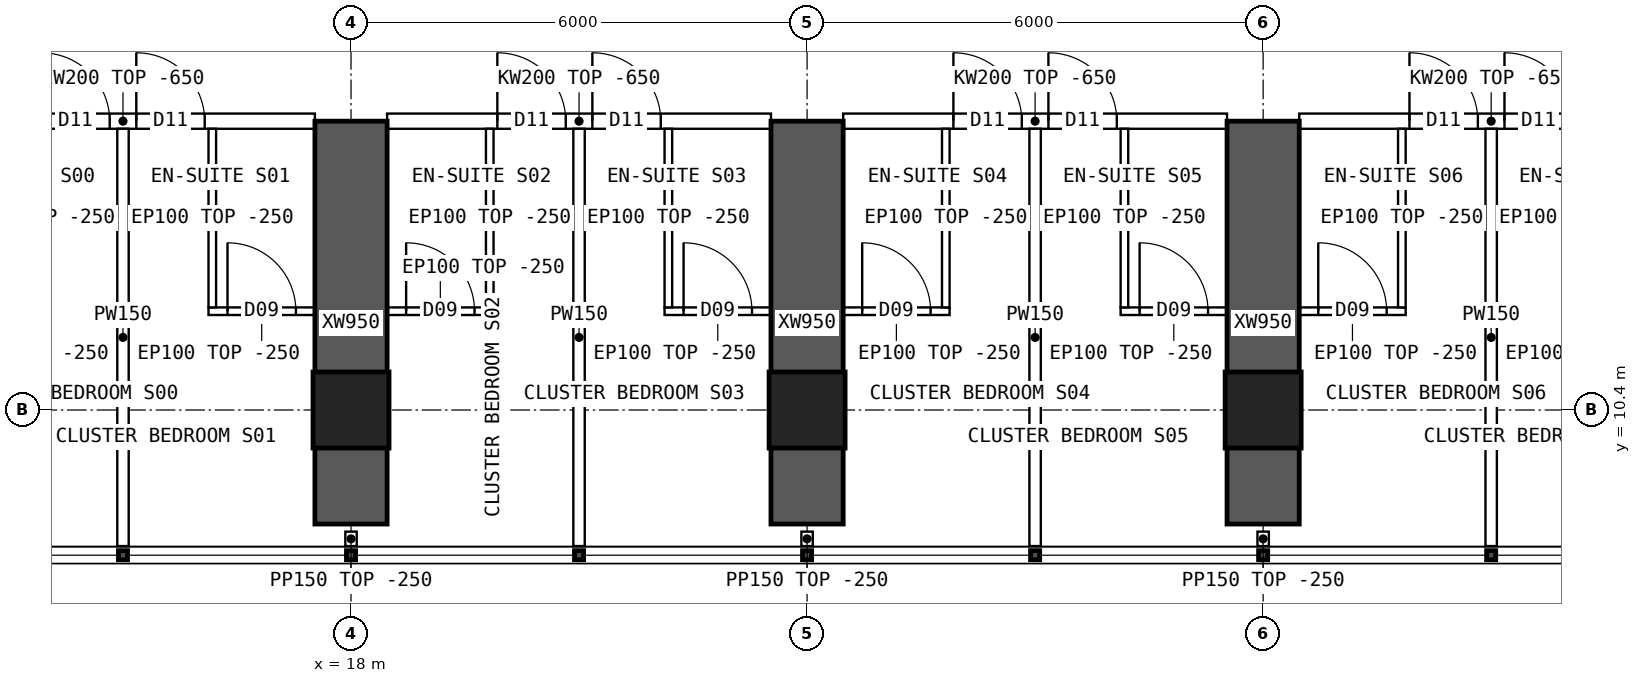
"""IFC4 building model, lengths in metres.
Left out: names, types, materials, properties, quantities, classifications, styles, units other than length and angle.
Written with IfcOpenShell. Run it as: python <this file> out.ifc"""

import sys

from ifc_helpers import new_model, si_unit, direction, frame, frame_2d, origin, origin_2d, place, context, subcontext, project, spatial, polyline, rectangle, hollow_rectangle, outline, extrude, element, fill, save


model = new_model("IFC4")
c1 = context("Model", 3, precision=1e-05, world=origin(), true_north=direction((0.0, 1.0)))
c2 = subcontext(c1, "Body", "Model", "MODEL_VIEW")
j1 = project(units=[si_unit("LENGTHUNIT", "METRE"), si_unit("PLANEANGLEUNIT", "RADIAN")], contexts=[c1])
p1 = place(None, origin())
s1 = spatial("IfcSite", under=j1, at=p1, CompositionType="ELEMENT")
p2 = place(p1, origin())
s2 = spatial("IfcBuilding", under=s1, at=p2, CompositionType="ELEMENT")
p3 = place(p2, frame((0.0, 0.0, 88.15)))
s3 = spatial("IfcBuildingStorey", under=s2, at=p3, CompositionType="ELEMENT", Elevation=88.15)
for number, where, z_axis, x_axis in (
    (1, (18.0, 10.4, 0.0), (0.0, 0.0, 1.0), (1.0, 0.0, 0.0)),
    (2, (24.0, 10.4, 0.0), (0.0, 0.0, 1.0), (1.0, 0.0, 0.0)),
    (3, (30.0, 10.4, 0.0), (0.0, 0.0, 1.0), (1.0, 0.0, 0.0)),
):
    element("IfcColumn", number, at=place(p3, frame(where, z_axis=z_axis, x_axis=x_axis)), inside=s3, PredefinedType="COLUMN", context=c2, shape_type="SweptSolid", body=[
        extrude(hollow_rectangle(XDim=1.0, YDim=1.0, WallThickness=0.1, at=origin_2d()), origin(), (0.0, 0.0, 1.0), 3.75),
    ])
for number, where, z_axis, x_axis in (
    (4, (18.0, 8.9, 0.0), (0.0, 0.0, 1.0), (0.0, 1.0, 0.0)),
    (5, (24.0, 8.9, 0.0), (0.0, 0.0, 1.0), (0.0, 1.0, 0.0)),
    (6, (30.0, 8.9, 0.0), (0.0, 0.0, 1.0), (0.0, 1.0, 0.0)),
):
    element("IfcWall", number, at=place(p3, frame(where, z_axis=z_axis, x_axis=x_axis)), inside=s3, PredefinedType="SHEAR", context=c2, shape_type="SweptSolid", body=[
        extrude(rectangle(XDim=5.3, YDim=0.95, at=frame_2d((2.65, 0.0))), origin(), (0.0, 0.0, 1.0), 3.75),
    ])
p4 = place(p3, frame((12.475, 14.2, 0.0), z_axis=(0.0, 0.0, 1.0), x_axis=(1.0, 0.0, 0.0)))
e7 = element("IfcWall", 7, at=p4, inside=s3, PredefinedType="SOLIDWALL", context=c2, shape_type="SweptSolid", body=[
    extrude(outline(polyline([(0.0, 0.0), (5.05, 0.0), (5.05, 3.1), (0.0, 3.1), (0.0, 0.0)])), frame((0.0, 0.1, 0.0), z_axis=(0.0, -1.0, 0.0), x_axis=(1.0, 0.0, 0.0)), (0.0, 0.0, 1.0), 0.2),
])
p5 = place(p4, frame((1.45, 0.0, 0.0)))
e8 = element("IfcOpeningElement", 8, at=p5, cuts=e7, PredefinedType="OPENING", context=c2, shape_type="SweptSolid", body=[
    extrude(rectangle(XDim=0.9, YDim=2.1, at=frame_2d((0.45, 1.05))), frame((0.0, 0.11, 0.0), z_axis=(0.0, -1.0, 0.0), x_axis=(1.0, 0.0, 0.0)), (0.0, 0.0, 1.0), 0.22),
])
p6 = place(p4, frame((2.7, 0.0, 0.0)))
e9 = element("IfcOpeningElement", 9, at=p6, cuts=e7, PredefinedType="OPENING", context=c2, shape_type="SweptSolid", body=[
    extrude(rectangle(XDim=0.9, YDim=2.1, at=frame_2d((0.45, 1.05))), frame((0.0, 0.11, 0.0), z_axis=(0.0, -1.0, 0.0), x_axis=(1.0, 0.0, 0.0)), (0.0, 0.0, 1.0), 0.22),
])
p7 = place(p3, frame((18.475, 14.2, 0.0), z_axis=(0.0, 0.0, 1.0), x_axis=(1.0, 0.0, 0.0)))
e10 = element("IfcWall", 10, at=p7, inside=s3, PredefinedType="SOLIDWALL", context=c2, shape_type="SweptSolid", body=[
    extrude(outline(polyline([(0.0, 0.0), (5.05, 0.0), (5.05, 3.1), (0.0, 3.1), (0.0, 0.0)])), frame((0.0, 0.1, 0.0), z_axis=(0.0, -1.0, 0.0), x_axis=(1.0, 0.0, 0.0)), (0.0, 0.0, 1.0), 0.2),
])
p8 = place(p7, frame((1.45, 0.0, 0.0)))
e11 = element("IfcOpeningElement", 11, at=p8, cuts=e10, PredefinedType="OPENING", context=c2, shape_type="SweptSolid", body=[
    extrude(rectangle(XDim=0.9, YDim=2.1, at=frame_2d((0.45, 1.05))), frame((0.0, 0.11, 0.0), z_axis=(0.0, -1.0, 0.0), x_axis=(1.0, 0.0, 0.0)), (0.0, 0.0, 1.0), 0.22),
])
p9 = place(p7, frame((2.7, 0.0, 0.0)))
e12 = element("IfcOpeningElement", 12, at=p9, cuts=e10, PredefinedType="OPENING", context=c2, shape_type="SweptSolid", body=[
    extrude(rectangle(XDim=0.9, YDim=2.1, at=frame_2d((0.45, 1.05))), frame((0.0, 0.11, 0.0), z_axis=(0.0, -1.0, 0.0), x_axis=(1.0, 0.0, 0.0)), (0.0, 0.0, 1.0), 0.22),
])
p10 = place(p3, frame((24.475, 14.2, 0.0), z_axis=(0.0, 0.0, 1.0), x_axis=(1.0, 0.0, 0.0)))
e13 = element("IfcWall", 13, at=p10, inside=s3, PredefinedType="SOLIDWALL", context=c2, shape_type="SweptSolid", body=[
    extrude(outline(polyline([(0.0, 0.0), (5.05, 0.0), (5.05, 3.1), (0.0, 3.1), (0.0, 0.0)])), frame((0.0, 0.1, 0.0), z_axis=(0.0, -1.0, 0.0), x_axis=(1.0, 0.0, 0.0)), (0.0, 0.0, 1.0), 0.2),
])
p11 = place(p10, frame((1.45, 0.0, 0.0)))
e14 = element("IfcOpeningElement", 14, at=p11, cuts=e13, PredefinedType="OPENING", context=c2, shape_type="SweptSolid", body=[
    extrude(rectangle(XDim=0.9, YDim=2.1, at=frame_2d((0.45, 1.05))), frame((0.0, 0.11, 0.0), z_axis=(0.0, -1.0, 0.0), x_axis=(1.0, 0.0, 0.0)), (0.0, 0.0, 1.0), 0.22),
])
p12 = place(p10, frame((2.7, 0.0, 0.0)))
e15 = element("IfcOpeningElement", 15, at=p12, cuts=e13, PredefinedType="OPENING", context=c2, shape_type="SweptSolid", body=[
    extrude(rectangle(XDim=0.9, YDim=2.1, at=frame_2d((0.45, 1.05))), frame((0.0, 0.11, 0.0), z_axis=(0.0, -1.0, 0.0), x_axis=(1.0, 0.0, 0.0)), (0.0, 0.0, 1.0), 0.22),
])
p13 = place(p3, frame((30.475, 14.2, 0.0), z_axis=(0.0, 0.0, 1.0), x_axis=(1.0, 0.0, 0.0)))
e16 = element("IfcWall", 16, at=p13, inside=s3, PredefinedType="SOLIDWALL", context=c2, shape_type="SweptSolid", body=[
    extrude(outline(polyline([(0.0, 0.0), (5.05, 0.0), (5.05, 3.1), (0.0, 3.1), (0.0, 0.0)])), frame((0.0, 0.1, 0.0), z_axis=(0.0, -1.0, 0.0), x_axis=(1.0, 0.0, 0.0)), (0.0, 0.0, 1.0), 0.2),
])
p14 = place(p13, frame((1.45, 0.0, 0.0)))
e17 = element("IfcOpeningElement", 17, at=p14, cuts=e16, PredefinedType="OPENING", context=c2, shape_type="SweptSolid", body=[
    extrude(rectangle(XDim=0.9, YDim=2.1, at=frame_2d((0.45, 1.05))), frame((0.0, 0.11, 0.0), z_axis=(0.0, -1.0, 0.0), x_axis=(1.0, 0.0, 0.0)), (0.0, 0.0, 1.0), 0.22),
])
p15 = place(p13, frame((2.7, 0.0, 0.0)))
e18 = element("IfcOpeningElement", 18, at=p15, cuts=e16, PredefinedType="OPENING", context=c2, shape_type="SweptSolid", body=[
    extrude(rectangle(XDim=0.9, YDim=2.1, at=frame_2d((0.45, 1.05))), frame((0.0, 0.11, 0.0), z_axis=(0.0, -1.0, 0.0), x_axis=(1.0, 0.0, 0.0)), (0.0, 0.0, 1.0), 0.22),
])
p16 = place(p3, frame((15.0, 8.61, 0.0), z_axis=(0.0, 0.0, 1.0), x_axis=(0.0, 1.0, 0.0)))
e19 = element("IfcWall", 19, at=p16, inside=s3, PredefinedType="PARTITIONING", context=c2, shape_type="SweptSolid", body=[
    extrude(outline(polyline([(0.0, 0.0), (5.49, 0.0), (5.49, 3.1), (5.442, 3.1), (5.44, 3.5), (1.992, 3.5), (1.99, 3.1), (1.592, 3.1), (1.59, 3.5), (0.0, 3.5), (0.0, 0.0)])), frame((0.0, 0.075, 0.0), z_axis=(0.0, -1.0, 0.0), x_axis=(1.0, 0.0, 0.0)), (0.0, 0.0, 1.0), 0.15),
])
p17 = place(p3, frame((17.525, 11.7, 0.0), z_axis=(0.0, 0.0, 1.0), x_axis=(-1.0, 0.0, 0.0)))
e20 = element("IfcWall", 20, at=p17, inside=s3, PredefinedType="PARTITIONING", context=c2, shape_type="SweptSolid", body=[
    extrude(rectangle(XDim=1.4, YDim=0.1, at=frame_2d((0.7, 0.0))), origin(), (0.0, 0.0, 1.0), 3.5),
])
p18 = place(p17, frame((0.25, 0.0, 0.0)))
e21 = element("IfcOpeningElement", 21, at=p18, cuts=e20, PredefinedType="OPENING", context=c2, shape_type="SweptSolid", body=[
    extrude(rectangle(XDim=0.9, YDim=2.1, at=frame_2d((0.45, 1.05))), frame((0.0, 0.06, 0.0), z_axis=(0.0, -1.0, 0.0), x_axis=(1.0, 0.0, 0.0)), (0.0, 0.0, 1.0), 0.12),
])
p19 = place(p3, frame((16.175, 11.75, 0.0), z_axis=(0.0, 0.0, 1.0), x_axis=(0.0, 1.0, 0.0)))
e22 = element("IfcWall", 22, at=p19, inside=s3, PredefinedType="PARTITIONING", context=c2, shape_type="SweptSolid", body=[
    extrude(outline(polyline([(0.0, 0.0), (2.35, 0.0), (2.35, 3.1), (2.302, 3.1), (2.3, 3.5), (0.0, 3.5), (0.0, 0.0)])), frame((0.0, 0.05, 0.0), z_axis=(0.0, -1.0, 0.0), x_axis=(1.0, 0.0, 0.0)), (0.0, 0.0, 1.0), 0.1),
])
p20 = place(p3, frame((21.0, 8.61, 0.0), z_axis=(0.0, 0.0, 1.0), x_axis=(0.0, 1.0, 0.0)))
e23 = element("IfcWall", 23, at=p20, inside=s3, PredefinedType="PARTITIONING", context=c2, shape_type="SweptSolid", body=[
    extrude(outline(polyline([(0.0, 0.0), (5.49, 0.0), (5.49, 3.1), (5.442, 3.1), (5.44, 3.5), (1.992, 3.5), (1.99, 3.1), (1.592, 3.1), (1.59, 3.5), (0.0, 3.5), (0.0, 0.0)])), frame((0.0, 0.075, 0.0), z_axis=(0.0, -1.0, 0.0), x_axis=(1.0, 0.0, 0.0)), (0.0, 0.0, 1.0), 0.15),
])
p21 = place(p3, frame((19.875, 11.7, 0.0), z_axis=(0.0, 0.0, 1.0), x_axis=(-1.0, 0.0, 0.0)))
e24 = element("IfcWall", 24, at=p21, inside=s3, PredefinedType="PARTITIONING", context=c2, shape_type="SweptSolid", body=[
    extrude(rectangle(XDim=1.4, YDim=0.1, at=frame_2d((0.7, 0.0))), origin(), (0.0, 0.0, 1.0), 3.5),
])
p22 = place(p21, frame((0.25, 0.0, 0.0)))
e25 = element("IfcOpeningElement", 25, at=p22, cuts=e24, PredefinedType="OPENING", context=c2, shape_type="SweptSolid", body=[
    extrude(rectangle(XDim=0.9, YDim=2.1, at=frame_2d((0.45, 1.05))), frame((0.0, 0.06, 0.0), z_axis=(0.0, -1.0, 0.0), x_axis=(1.0, 0.0, 0.0)), (0.0, 0.0, 1.0), 0.12),
])
p23 = place(p3, frame((19.825, 11.75, 0.0), z_axis=(0.0, 0.0, 1.0), x_axis=(0.0, 1.0, 0.0)))
e26 = element("IfcWall", 26, at=p23, inside=s3, PredefinedType="PARTITIONING", context=c2, shape_type="SweptSolid", body=[
    extrude(outline(polyline([(0.0, 0.0), (2.35, 0.0), (2.35, 3.1), (2.302, 3.1), (2.3, 3.5), (0.0, 3.5), (0.0, 0.0)])), frame((0.0, 0.05, 0.0), z_axis=(0.0, -1.0, 0.0), x_axis=(1.0, 0.0, 0.0)), (0.0, 0.0, 1.0), 0.1),
])
p24 = place(p3, frame((23.525, 11.7, 0.0), z_axis=(0.0, 0.0, 1.0), x_axis=(-1.0, 0.0, 0.0)))
e27 = element("IfcWall", 27, at=p24, inside=s3, PredefinedType="PARTITIONING", context=c2, shape_type="SweptSolid", body=[
    extrude(rectangle(XDim=1.4, YDim=0.1, at=frame_2d((0.7, 0.0))), origin(), (0.0, 0.0, 1.0), 3.5),
])
p25 = place(p24, frame((0.25, 0.0, 0.0)))
e28 = element("IfcOpeningElement", 28, at=p25, cuts=e27, PredefinedType="OPENING", context=c2, shape_type="SweptSolid", body=[
    extrude(rectangle(XDim=0.9, YDim=2.1, at=frame_2d((0.45, 1.05))), frame((0.0, 0.06, 0.0), z_axis=(0.0, -1.0, 0.0), x_axis=(1.0, 0.0, 0.0)), (0.0, 0.0, 1.0), 0.12),
])
p26 = place(p3, frame((22.175, 11.75, 0.0), z_axis=(0.0, 0.0, 1.0), x_axis=(0.0, 1.0, 0.0)))
e29 = element("IfcWall", 29, at=p26, inside=s3, PredefinedType="PARTITIONING", context=c2, shape_type="SweptSolid", body=[
    extrude(outline(polyline([(0.0, 0.0), (2.35, 0.0), (2.35, 3.1), (2.302, 3.1), (2.3, 3.5), (0.0, 3.5), (0.0, 0.0)])), frame((0.0, 0.05, 0.0), z_axis=(0.0, -1.0, 0.0), x_axis=(1.0, 0.0, 0.0)), (0.0, 0.0, 1.0), 0.1),
])
p27 = place(p3, frame((27.0, 8.61, 0.0), z_axis=(0.0, 0.0, 1.0), x_axis=(0.0, 1.0, 0.0)))
e30 = element("IfcWall", 30, at=p27, inside=s3, PredefinedType="PARTITIONING", context=c2, shape_type="SweptSolid", body=[
    extrude(outline(polyline([(0.0, 0.0), (5.49, 0.0), (5.49, 3.1), (5.442, 3.1), (5.44, 3.5), (1.992, 3.5), (1.99, 3.1), (1.592, 3.1), (1.59, 3.5), (0.0, 3.5), (0.0, 0.0)])), frame((0.0, 0.075, 0.0), z_axis=(0.0, -1.0, 0.0), x_axis=(1.0, 0.0, 0.0)), (0.0, 0.0, 1.0), 0.15),
])
p28 = place(p3, frame((25.875, 11.7, 0.0), z_axis=(0.0, 0.0, 1.0), x_axis=(-1.0, 0.0, 0.0)))
e31 = element("IfcWall", 31, at=p28, inside=s3, PredefinedType="PARTITIONING", context=c2, shape_type="SweptSolid", body=[
    extrude(rectangle(XDim=1.4, YDim=0.1, at=frame_2d((0.7, 0.0))), origin(), (0.0, 0.0, 1.0), 3.5),
])
p29 = place(p28, frame((0.25, 0.0, 0.0)))
e32 = element("IfcOpeningElement", 32, at=p29, cuts=e31, PredefinedType="OPENING", context=c2, shape_type="SweptSolid", body=[
    extrude(rectangle(XDim=0.9, YDim=2.1, at=frame_2d((0.45, 1.05))), frame((0.0, 0.06, 0.0), z_axis=(0.0, -1.0, 0.0), x_axis=(1.0, 0.0, 0.0)), (0.0, 0.0, 1.0), 0.12),
])
p30 = place(p3, frame((25.825, 11.75, 0.0), z_axis=(0.0, 0.0, 1.0), x_axis=(0.0, 1.0, 0.0)))
e33 = element("IfcWall", 33, at=p30, inside=s3, PredefinedType="PARTITIONING", context=c2, shape_type="SweptSolid", body=[
    extrude(outline(polyline([(0.0, 0.0), (2.35, 0.0), (2.35, 3.1), (2.302, 3.1), (2.3, 3.5), (0.0, 3.5), (0.0, 0.0)])), frame((0.0, 0.05, 0.0), z_axis=(0.0, -1.0, 0.0), x_axis=(1.0, 0.0, 0.0)), (0.0, 0.0, 1.0), 0.1),
])
p31 = place(p3, frame((29.525, 11.7, 0.0), z_axis=(0.0, 0.0, 1.0), x_axis=(-1.0, 0.0, 0.0)))
e34 = element("IfcWall", 34, at=p31, inside=s3, PredefinedType="PARTITIONING", context=c2, shape_type="SweptSolid", body=[
    extrude(rectangle(XDim=1.4, YDim=0.1, at=frame_2d((0.7, 0.0))), origin(), (0.0, 0.0, 1.0), 3.5),
])
p32 = place(p31, frame((0.25, 0.0, 0.0)))
e35 = element("IfcOpeningElement", 35, at=p32, cuts=e34, PredefinedType="OPENING", context=c2, shape_type="SweptSolid", body=[
    extrude(rectangle(XDim=0.9, YDim=2.1, at=frame_2d((0.45, 1.05))), frame((0.0, 0.06, 0.0), z_axis=(0.0, -1.0, 0.0), x_axis=(1.0, 0.0, 0.0)), (0.0, 0.0, 1.0), 0.12),
])
p33 = place(p3, frame((28.175, 11.75, 0.0), z_axis=(0.0, 0.0, 1.0), x_axis=(0.0, 1.0, 0.0)))
e36 = element("IfcWall", 36, at=p33, inside=s3, PredefinedType="PARTITIONING", context=c2, shape_type="SweptSolid", body=[
    extrude(outline(polyline([(0.0, 0.0), (2.35, 0.0), (2.35, 3.1), (2.302, 3.1), (2.3, 3.5), (0.0, 3.5), (0.0, 0.0)])), frame((0.0, 0.05, 0.0), z_axis=(0.0, -1.0, 0.0), x_axis=(1.0, 0.0, 0.0)), (0.0, 0.0, 1.0), 0.1),
])
p34 = place(p3, frame((33.0, 8.61, 0.0), z_axis=(0.0, 0.0, 1.0), x_axis=(0.0, 1.0, 0.0)))
e37 = element("IfcWall", 37, at=p34, inside=s3, PredefinedType="PARTITIONING", context=c2, shape_type="SweptSolid", body=[
    extrude(outline(polyline([(0.0, 0.0), (5.49, 0.0), (5.49, 3.1), (5.442, 3.1), (5.44, 3.5), (1.992, 3.5), (1.99, 3.1), (1.592, 3.1), (1.59, 3.5), (0.0, 3.5), (0.0, 0.0)])), frame((0.0, 0.075, 0.0), z_axis=(0.0, -1.0, 0.0), x_axis=(1.0, 0.0, 0.0)), (0.0, 0.0, 1.0), 0.15),
])
p35 = place(p3, frame((31.875, 11.7, 0.0), z_axis=(0.0, 0.0, 1.0), x_axis=(-1.0, 0.0, 0.0)))
e38 = element("IfcWall", 38, at=p35, inside=s3, PredefinedType="PARTITIONING", context=c2, shape_type="SweptSolid", body=[
    extrude(rectangle(XDim=1.4, YDim=0.1, at=frame_2d((0.7, 0.0))), origin(), (0.0, 0.0, 1.0), 3.5),
])
p36 = place(p35, frame((0.25, 0.0, 0.0)))
e39 = element("IfcOpeningElement", 39, at=p36, cuts=e38, PredefinedType="OPENING", context=c2, shape_type="SweptSolid", body=[
    extrude(rectangle(XDim=0.9, YDim=2.1, at=frame_2d((0.45, 1.05))), frame((0.0, 0.06, 0.0), z_axis=(0.0, -1.0, 0.0), x_axis=(1.0, 0.0, 0.0)), (0.0, 0.0, 1.0), 0.12),
])
p37 = place(p3, frame((31.825, 11.75, 0.0), z_axis=(0.0, 0.0, 1.0), x_axis=(0.0, 1.0, 0.0)))
e40 = element("IfcWall", 40, at=p37, inside=s3, PredefinedType="PARTITIONING", context=c2, shape_type="SweptSolid", body=[
    extrude(outline(polyline([(0.0, 0.0), (2.35, 0.0), (2.35, 3.1), (2.302, 3.1), (2.3, 3.5), (0.0, 3.5), (0.0, 0.0)])), frame((0.0, 0.05, 0.0), z_axis=(0.0, -1.0, 0.0), x_axis=(1.0, 0.0, 0.0)), (0.0, 0.0, 1.0), 0.1),
])
for number, where, z_axis, x_axis in (
    (41, (18.0, 8.8, 0.0), (0.0, 0.0, 1.0), (0.0, -1.0, 0.0)),
    (42, (24.0, 8.8, 0.0), (0.0, 0.0, 1.0), (0.0, -1.0, 0.0)),
    (43, (30.0, 8.8, 0.0), (0.0, 0.0, 1.0), (0.0, -1.0, 0.0)),
):
    element("IfcWall", number, at=place(p3, frame(where, z_axis=z_axis, x_axis=x_axis)), inside=s3, PredefinedType="PARTITIONING", context=c2, shape_type="SweptSolid", body=[
        extrude(rectangle(XDim=0.19, YDim=0.15, at=frame_2d((0.095, 0.0))), origin(), (0.0, 0.0, 1.0), 3.5),
    ])
p38 = place(p5, origin())
e44 = element("IfcDoor", 44, at=p38, inside=s3, OperationType="SINGLE_SWING_LEFT", PredefinedType="DOOR", context=c2, shape_type="SweptSolid", body=[
    extrude(rectangle(XDim=0.9, YDim=2.1, at=frame_2d((0.45, 1.05))), frame((0.0, 0.025, 0.0), z_axis=(0.0, -1.0, 0.0), x_axis=(1.0, 0.0, 0.0)), (0.0, 0.0, 1.0), 0.05),
])
fill(e8, e44)
p39 = place(p18, origin())
e45 = element("IfcDoor", 45, at=p39, inside=s3, OperationType="SINGLE_SWING_RIGHT", PredefinedType="DOOR", context=c2, shape_type="SweptSolid", body=[
    extrude(rectangle(XDim=0.9, YDim=2.1, at=frame_2d((0.45, 1.05))), frame((0.0, 0.025, 0.0), z_axis=(0.0, -1.0, 0.0), x_axis=(1.0, 0.0, 0.0)), (0.0, 0.0, 1.0), 0.05),
])
fill(e21, e45)
p40 = place(p6, origin())
e46 = element("IfcDoor", 46, at=p40, inside=s3, OperationType="SINGLE_SWING_LEFT", PredefinedType="DOOR", context=c2, shape_type="SweptSolid", body=[
    extrude(rectangle(XDim=0.9, YDim=2.1, at=frame_2d((0.45, 1.05))), frame((0.0, 0.025, 0.0), z_axis=(0.0, -1.0, 0.0), x_axis=(1.0, 0.0, 0.0)), (0.0, 0.0, 1.0), 0.05),
])
fill(e9, e46)
p41 = place(p22, origin())
e47 = element("IfcDoor", 47, at=p41, inside=s3, OperationType="SINGLE_SWING_RIGHT", PredefinedType="DOOR", context=c2, shape_type="SweptSolid", body=[
    extrude(rectangle(XDim=0.9, YDim=2.1, at=frame_2d((0.45, 1.05))), frame((0.0, 0.025, 0.0), z_axis=(0.0, -1.0, 0.0), x_axis=(1.0, 0.0, 0.0)), (0.0, 0.0, 1.0), 0.05),
])
fill(e25, e47)
p42 = place(p8, origin())
e48 = element("IfcDoor", 48, at=p42, inside=s3, OperationType="SINGLE_SWING_LEFT", PredefinedType="DOOR", context=c2, shape_type="SweptSolid", body=[
    extrude(rectangle(XDim=0.9, YDim=2.1, at=frame_2d((0.45, 1.05))), frame((0.0, 0.025, 0.0), z_axis=(0.0, -1.0, 0.0), x_axis=(1.0, 0.0, 0.0)), (0.0, 0.0, 1.0), 0.05),
])
fill(e11, e48)
p43 = place(p25, origin())
e49 = element("IfcDoor", 49, at=p43, inside=s3, OperationType="SINGLE_SWING_RIGHT", PredefinedType="DOOR", context=c2, shape_type="SweptSolid", body=[
    extrude(rectangle(XDim=0.9, YDim=2.1, at=frame_2d((0.45, 1.05))), frame((0.0, 0.025, 0.0), z_axis=(0.0, -1.0, 0.0), x_axis=(1.0, 0.0, 0.0)), (0.0, 0.0, 1.0), 0.05),
])
fill(e28, e49)
p44 = place(p9, origin())
e50 = element("IfcDoor", 50, at=p44, inside=s3, OperationType="SINGLE_SWING_LEFT", PredefinedType="DOOR", context=c2, shape_type="SweptSolid", body=[
    extrude(rectangle(XDim=0.9, YDim=2.1, at=frame_2d((0.45, 1.05))), frame((0.0, 0.025, 0.0), z_axis=(0.0, -1.0, 0.0), x_axis=(1.0, 0.0, 0.0)), (0.0, 0.0, 1.0), 0.05),
])
fill(e12, e50)
p45 = place(p29, origin())
e51 = element("IfcDoor", 51, at=p45, inside=s3, OperationType="SINGLE_SWING_RIGHT", PredefinedType="DOOR", context=c2, shape_type="SweptSolid", body=[
    extrude(rectangle(XDim=0.9, YDim=2.1, at=frame_2d((0.45, 1.05))), frame((0.0, 0.025, 0.0), z_axis=(0.0, -1.0, 0.0), x_axis=(1.0, 0.0, 0.0)), (0.0, 0.0, 1.0), 0.05),
])
fill(e32, e51)
p46 = place(p11, origin())
e52 = element("IfcDoor", 52, at=p46, inside=s3, OperationType="SINGLE_SWING_LEFT", PredefinedType="DOOR", context=c2, shape_type="SweptSolid", body=[
    extrude(rectangle(XDim=0.9, YDim=2.1, at=frame_2d((0.45, 1.05))), frame((0.0, 0.025, 0.0), z_axis=(0.0, -1.0, 0.0), x_axis=(1.0, 0.0, 0.0)), (0.0, 0.0, 1.0), 0.05),
])
fill(e14, e52)
p47 = place(p32, origin())
e53 = element("IfcDoor", 53, at=p47, inside=s3, OperationType="SINGLE_SWING_RIGHT", PredefinedType="DOOR", context=c2, shape_type="SweptSolid", body=[
    extrude(rectangle(XDim=0.9, YDim=2.1, at=frame_2d((0.45, 1.05))), frame((0.0, 0.025, 0.0), z_axis=(0.0, -1.0, 0.0), x_axis=(1.0, 0.0, 0.0)), (0.0, 0.0, 1.0), 0.05),
])
fill(e35, e53)
p48 = place(p12, origin())
e54 = element("IfcDoor", 54, at=p48, inside=s3, OperationType="SINGLE_SWING_LEFT", PredefinedType="DOOR", context=c2, shape_type="SweptSolid", body=[
    extrude(rectangle(XDim=0.9, YDim=2.1, at=frame_2d((0.45, 1.05))), frame((0.0, 0.025, 0.0), z_axis=(0.0, -1.0, 0.0), x_axis=(1.0, 0.0, 0.0)), (0.0, 0.0, 1.0), 0.05),
])
fill(e15, e54)
p49 = place(p36, origin())
e55 = element("IfcDoor", 55, at=p49, inside=s3, OperationType="SINGLE_SWING_RIGHT", PredefinedType="DOOR", context=c2, shape_type="SweptSolid", body=[
    extrude(rectangle(XDim=0.9, YDim=2.1, at=frame_2d((0.45, 1.05))), frame((0.0, 0.025, 0.0), z_axis=(0.0, -1.0, 0.0), x_axis=(1.0, 0.0, 0.0)), (0.0, 0.0, 1.0), 0.05),
])
fill(e39, e55)
p50 = place(p14, origin())
e56 = element("IfcDoor", 56, at=p50, inside=s3, OperationType="SINGLE_SWING_LEFT", PredefinedType="DOOR", context=c2, shape_type="SweptSolid", body=[
    extrude(rectangle(XDim=0.9, YDim=2.1, at=frame_2d((0.45, 1.05))), frame((0.0, 0.025, 0.0), z_axis=(0.0, -1.0, 0.0), x_axis=(1.0, 0.0, 0.0)), (0.0, 0.0, 1.0), 0.05),
])
fill(e17, e56)
p51 = place(p15, origin())
e57 = element("IfcDoor", 57, at=p51, inside=s3, OperationType="SINGLE_SWING_LEFT", PredefinedType="DOOR", context=c2, shape_type="SweptSolid", body=[
    extrude(rectangle(XDim=0.9, YDim=2.1, at=frame_2d((0.45, 1.05))), frame((0.0, 0.025, 0.0), z_axis=(0.0, -1.0, 0.0), x_axis=(1.0, 0.0, 0.0)), (0.0, 0.0, 1.0), 0.05),
])
fill(e18, e57)
save(model, sys.argv[1])
